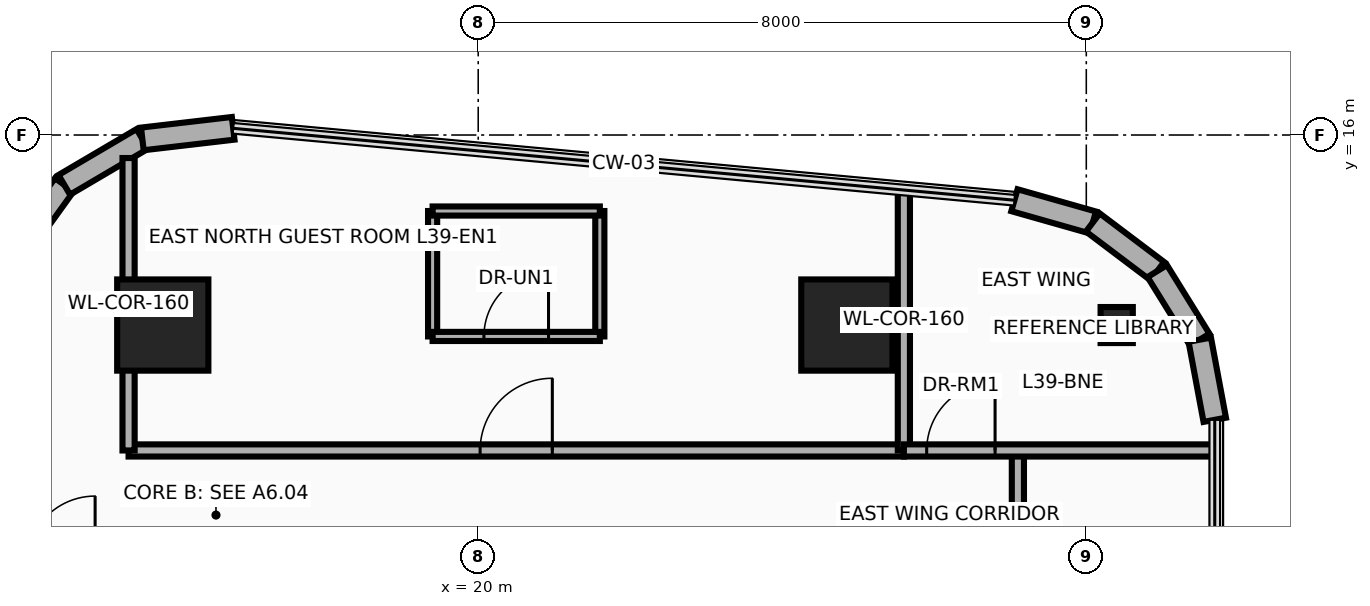
"""IFC4 building model, lengths in metres.
Left out: names, types, materials, properties, quantities, classifications, styles, units other than length and angle.
Written with IfcOpenShell. Run it as: python <this file> out.ifc"""

import sys

from ifc_helpers import new_model, si_unit, direction, frame, frame_2d, origin, origin_2d, place, context, subcontext, project, spatial, rectangle, i_section, extrude, source, transform, mapped, element, fill, save


model = new_model("IFC4")
c1 = context("Model", 3, precision=1e-05, world=origin(), true_north=direction((0.0, 1.0)))
c2 = subcontext(c1, "Body", "Model", "MODEL_VIEW")
j1 = project(units=[si_unit("LENGTHUNIT", "METRE"), si_unit("PLANEANGLEUNIT", "RADIAN")], contexts=[c1])
p1 = place(None, origin())
s1 = spatial("IfcSite", under=j1, at=p1, CompositionType="ELEMENT")
p2 = place(p1, origin())
s2 = spatial("IfcBuilding", under=s1, at=p2, CompositionType="ELEMENT")
p3 = place(p2, frame((0.0, 0.0, 153.8)))
s3 = spatial("IfcBuildingStorey", under=s2, at=p3, CompositionType="ELEMENT", Elevation=153.8)
m1 = source(origin(), c2, "Body", "SweptSolid", [
    extrude(rectangle(XDim=1.2, YDim=1.2, at=origin_2d()), origin(), (0.0, 0.0, 1.0), 3.7),
])
for number, where, z_axis, x_axis in (
    (1, (15.85, 13.5, 0.0), (0.0, 0.0, 1.0), (1.0, 0.0, 0.0)),
    (2, (24.85, 13.5, 0.0), (0.0, 0.0, 1.0), (1.0, 0.0, 0.0)),
):
    element("IfcColumn", number, at=place(p3, frame(where, z_axis=z_axis, x_axis=x_axis)), inside=s3, PredefinedType="COLUMN", context=c2, shape_type="MappedRepresentation", body=[
        mapped(m1, transform((0.0, 0.0, 0.0), x_axis=(1.0, 0.0, 0.0), y_axis=(0.0, 1.0, 0.0), z_axis=(0.0, 0.0, 1.0), scale=1.0)),
    ])
m2 = source(origin(), c2, "Body", "SweptSolid", [
    extrude(i_section(OverallWidth=0.424, OverallDepth=0.474, WebThickness=0.048, FlangeThickness=0.077, at=origin_2d()), origin(), (0.0, 0.0, 1.0), 3.7),
])
p4 = place(p3, frame((28.4, 13.5, 0.0), z_axis=(0.0, 0.0, 1.0), x_axis=(1.0, 0.0, 0.0)))
e3 = element("IfcColumn", 3, at=p4, inside=s3, PredefinedType="COLUMN", context=c2, shape_type="MappedRepresentation", body=[
    mapped(m2, transform((0.0, 0.0, 0.0), x_axis=(1.0, 0.0, 0.0), y_axis=(0.0, 1.0, 0.0), z_axis=(0.0, 0.0, 1.0), scale=1.0)),
])
for number, where, z_axis, x_axis in (
    (4, (13.858, 14.377, 0.0), (0.0, 0.0, 1.0), (0.584, 0.812, 0.0)),
    (5, (14.554, 15.344, 0.0), (0.0, 0.0, 1.0), (0.862, 0.507, 0.0)),
):
    element("IfcWall", number, at=place(p3, frame(where, z_axis=z_axis, x_axis=x_axis)), inside=s3, PredefinedType="SOLIDWALL", context=c2, shape_type="SweptSolid", body=[
        extrude(rectangle(XDim=1.192, YDim=0.3, at=frame_2d((0.596, 0.0))), origin(), (0.0, 0.0, 1.0), 3.46),
    ])
p5 = place(p3, frame((15.581, 15.949, 0.0), z_axis=(0.0, 0.0, 1.0), x_axis=(0.993288417722, 0.115663819837, 0.0)))
e6 = element("IfcWall", 6, at=p5, inside=s3, PredefinedType="SOLIDWALL", context=c2, shape_type="SweptSolid", body=[
    extrude(rectangle(XDim=1.203, YDim=0.3, at=frame_2d((0.602, 0.0))), origin(), (0.0, 0.0, 1.0), 3.46),
])
p6 = place(p3, frame((27.055, 15.142, 0.0), z_axis=(0.0, 0.0, 1.0), x_axis=(0.962012179147, -0.273006533206, 0.0)))
e7 = element("IfcWall", 7, at=p6, inside=s3, PredefinedType="SOLIDWALL", context=c2, shape_type="SweptSolid", body=[
    extrude(rectangle(XDim=1.072, YDim=0.3, at=frame_2d((0.536, 0.0))), origin(), (0.0, 0.0, 1.0), 3.46),
])
for number, where, z_axis, x_axis in (
    (8, (28.086, 14.849, 0.0), (0.0, 0.0, 1.0), (0.798, -0.602, 0.0)),
    (9, (28.934, 14.21, 0.0), (0.0, 0.0, 1.0), (0.527, -0.85, 0.0)),
):
    element("IfcWall", number, at=place(p3, frame(where, z_axis=z_axis, x_axis=x_axis)), inside=s3, PredefinedType="SOLIDWALL", context=c2, shape_type="SweptSolid", body=[
        extrude(rectangle(XDim=1.062, YDim=0.3, at=frame_2d((0.531, 0.0))), origin(), (0.0, 0.0, 1.0), 3.46),
    ])
p7 = place(p3, frame((29.493, 13.307, 0.0), z_axis=(0.0, 0.0, 1.0), x_axis=(0.183752343116, -0.98297257154, 0.0)))
e10 = element("IfcWall", 10, at=p7, inside=s3, PredefinedType="SOLIDWALL", context=c2, shape_type="SweptSolid", body=[
    extrude(rectangle(XDim=1.072, YDim=0.3, at=frame_2d((0.536, 0.0))), origin(), (0.0, 0.0, 1.0), 3.46),
])
p8 = place(p3, frame((15.4, 11.85, 0.0), z_axis=(0.0, 0.0, 1.0), x_axis=(1.0, 0.0, 0.0)))
e11 = element("IfcWall", 11, at=p8, inside=s3, PredefinedType="PARTITIONING", context=c2, shape_type="SweptSolid", body=[
    extrude(rectangle(XDim=10.2, YDim=0.16, at=frame_2d((5.1, 0.0))), origin(), (0.0, 0.0, 1.0), 2.834),
])
p9 = place(p8, frame((4.625, 0.0, 0.0)))
e12 = element("IfcOpeningElement", 12, at=p9, cuts=e11, PredefinedType="OPENING", context=c2, shape_type="SweptSolid", body=[
    extrude(rectangle(XDim=0.95, YDim=2.15, at=frame_2d((0.475, 1.075))), frame((0.0, 0.095, 0.0), z_axis=(0.0, -1.0, 0.0), x_axis=(1.0, 0.0, 0.0)), (0.0, 0.0, 1.0), 0.19),
])
p10 = place(p3, frame((15.4, 11.85, 0.0), z_axis=(0.0, 0.0, 1.0), x_axis=(0.0, 1.0, 0.0)))
e13 = element("IfcWall", 13, at=p10, inside=s3, PredefinedType="PARTITIONING", context=c2, shape_type="SweptSolid", body=[
    extrude(rectangle(XDim=3.847, YDim=0.16, at=frame_2d((1.923, 0.0))), origin(), (0.0, 0.0, 1.0), 3.46),
])
p11 = place(p3, frame((25.6, 11.85, 0.0), z_axis=(0.0, 0.0, 1.0), x_axis=(0.0, 1.0, 0.0)))
e14 = element("IfcWall", 14, at=p11, inside=s3, PredefinedType="PARTITIONING", context=c2, shape_type="SweptSolid", body=[
    extrude(rectangle(XDim=3.426, YDim=0.16, at=frame_2d((1.713, 0.0))), origin(), (0.0, 0.0, 1.0), 2.666),
])
for number, where, z_axis, x_axis in (
    (15, (19.4, 13.35, 0.0), (0.0, 0.0, 1.0), (0.0, 1.0, 0.0)),
    (16, (21.6, 13.35, 0.0), (0.0, 0.0, 1.0), (0.0, 1.0, 0.0)),
):
    element("IfcWall", number, at=place(p3, frame(where, z_axis=z_axis, x_axis=x_axis)), inside=s3, PredefinedType="PARTITIONING", context=c2, shape_type="SweptSolid", body=[
        extrude(rectangle(XDim=1.65, YDim=0.12, at=frame_2d((0.825, 0.0))), origin(), (0.0, 0.0, 1.0), 2.666),
    ])
p12 = place(p3, frame((19.4, 15.0, 0.0), z_axis=(0.0, 0.0, 1.0), x_axis=(1.0, 0.0, 0.0)))
e17 = element("IfcWall", 17, at=p12, inside=s3, PredefinedType="PARTITIONING", context=c2, shape_type="SweptSolid", body=[
    extrude(rectangle(XDim=2.2, YDim=0.12, at=frame_2d((1.1, 0.0))), origin(), (0.0, 0.0, 1.0), 3.46),
])
p13 = place(p3, frame((19.4, 13.35, 0.0), z_axis=(0.0, 0.0, 1.0), x_axis=(1.0, 0.0, 0.0)))
e18 = element("IfcWall", 18, at=p13, inside=s3, PredefinedType="PARTITIONING", context=c2, shape_type="SweptSolid", body=[
    extrude(rectangle(XDim=2.2, YDim=0.12, at=frame_2d((1.1, 0.0))), origin(), (0.0, 0.0, 1.0), 2.666),
])
p14 = place(p13, frame((0.675, 0.0, 0.0)))
e19 = element("IfcOpeningElement", 19, at=p14, cuts=e18, PredefinedType="OPENING", context=c2, shape_type="SweptSolid", body=[
    extrude(rectangle(XDim=0.85, YDim=2.1, at=frame_2d((0.425, 1.05))), frame((0.0, 0.075, 0.0), z_axis=(0.0, -1.0, 0.0), x_axis=(1.0, 0.0, 0.0)), (0.0, 0.0, 1.0), 0.15),
])
p15 = place(p3, frame((27.1, -11.701, 0.0), z_axis=(0.0, 0.0, 1.0), x_axis=(0.0, 1.0, 0.0)))
e20 = element("IfcWall", 20, at=p15, inside=s3, PredefinedType="PARTITIONING", context=c2, shape_type="SweptSolid", body=[
    extrude(rectangle(XDim=23.551, YDim=0.16, at=frame_2d((11.775, 0.0))), origin(), (0.0, 0.0, 1.0), 2.666),
])
p16 = place(p15, frame((0.8, 0.0, 0.0)))
e21 = element("IfcOpeningElement", 21, at=p16, cuts=e20, PredefinedType="OPENING", context=c2, shape_type="SweptSolid", body=[
    extrude(rectangle(XDim=0.9, YDim=2.1, at=frame_2d((0.45, 1.05))), frame((0.0, 0.095, 0.0), z_axis=(0.0, -1.0, 0.0), x_axis=(1.0, 0.0, 0.0)), (0.0, 0.0, 1.0), 0.19),
])
p17 = place(p15, frame((6.32, 0.0, 0.0)))
e22 = element("IfcOpeningElement", 22, at=p17, cuts=e20, PredefinedType="OPENING", context=c2, shape_type="SweptSolid", body=[
    extrude(rectangle(XDim=0.9, YDim=2.1, at=frame_2d((0.45, 1.05))), frame((0.0, 0.095, 0.0), z_axis=(0.0, -1.0, 0.0), x_axis=(1.0, 0.0, 0.0)), (0.0, 0.0, 1.0), 0.19),
])
p18 = place(p15, frame((13.032, 0.0, 0.0)))
e23 = element("IfcOpeningElement", 23, at=p18, cuts=e20, PredefinedType="OPENING", context=c2, shape_type="SweptSolid", body=[
    extrude(rectangle(XDim=0.9, YDim=2.1, at=frame_2d((0.45, 1.05))), frame((0.0, 0.095, 0.0), z_axis=(0.0, -1.0, 0.0), x_axis=(1.0, 0.0, 0.0)), (0.0, 0.0, 1.0), 0.19),
])
p19 = place(p15, frame((19.745, 0.0, 0.0)))
e24 = element("IfcOpeningElement", 24, at=p19, cuts=e20, PredefinedType="OPENING", context=c2, shape_type="SweptSolid", body=[
    extrude(rectangle(XDim=0.9, YDim=2.1, at=frame_2d((0.45, 1.05))), frame((0.0, 0.095, 0.0), z_axis=(0.0, -1.0, 0.0), x_axis=(1.0, 0.0, 0.0)), (0.0, 0.0, 1.0), 0.19),
])
p20 = place(p3, frame((25.6, 11.85, 0.0), z_axis=(0.0, 0.0, 1.0), x_axis=(1.0, 0.0, 0.0)))
e25 = element("IfcWall", 25, at=p20, inside=s3, PredefinedType="PARTITIONING", context=c2, shape_type="SweptSolid", body=[
    extrude(rectangle(XDim=4.09, YDim=0.16, at=frame_2d((2.045, 0.0))), origin(), (0.0, 0.0, 1.0), 2.896),
])
p21 = place(p20, frame((0.3, 0.0, 0.0)))
e26 = element("IfcOpeningElement", 26, at=p21, cuts=e25, PredefinedType="OPENING", context=c2, shape_type="SweptSolid", body=[
    extrude(rectangle(XDim=0.9, YDim=2.1, at=frame_2d((0.45, 1.05))), frame((0.0, 0.095, 0.0), z_axis=(0.0, -1.0, 0.0), x_axis=(1.0, 0.0, 0.0)), (0.0, 0.0, 1.0), 0.19),
])
p22 = place(p9, origin())
e27 = element("IfcDoor", 27, at=p22, inside=s3, OperationType="SINGLE_SWING_RIGHT", PredefinedType="DOOR", context=c2, shape_type="SweptSolid", body=[
    extrude(rectangle(XDim=0.95, YDim=2.15, at=frame_2d((0.475, 1.075))), frame((0.0, 0.025, 0.0), z_axis=(0.0, -1.0, 0.0), x_axis=(1.0, 0.0, 0.0)), (0.0, 0.0, 1.0), 0.05),
])
fill(e12, e27)
p23 = place(p14, origin())
e28 = element("IfcDoor", 28, at=p23, inside=s3, OperationType="SINGLE_SWING_LEFT", PredefinedType="DOOR", context=c2, shape_type="SweptSolid", body=[
    extrude(rectangle(XDim=0.85, YDim=2.1, at=frame_2d((0.425, 1.05))), frame((0.0, 0.025, 0.0), z_axis=(0.0, -1.0, 0.0), x_axis=(1.0, 0.0, 0.0)), (0.0, 0.0, 1.0), 0.05),
])
fill(e19, e28)
p24 = place(p21, origin())
e29 = element("IfcDoor", 29, at=p24, inside=s3, OperationType="SINGLE_SWING_LEFT", PredefinedType="DOOR", context=c2, shape_type="SweptSolid", body=[
    extrude(rectangle(XDim=0.9, YDim=2.1, at=frame_2d((0.45, 1.05))), frame((0.0, 0.025, 0.0), z_axis=(0.0, -1.0, 0.0), x_axis=(1.0, 0.0, 0.0)), (0.0, 0.0, 1.0), 0.05),
])
fill(e26, e29)
save(model, sys.argv[1])
